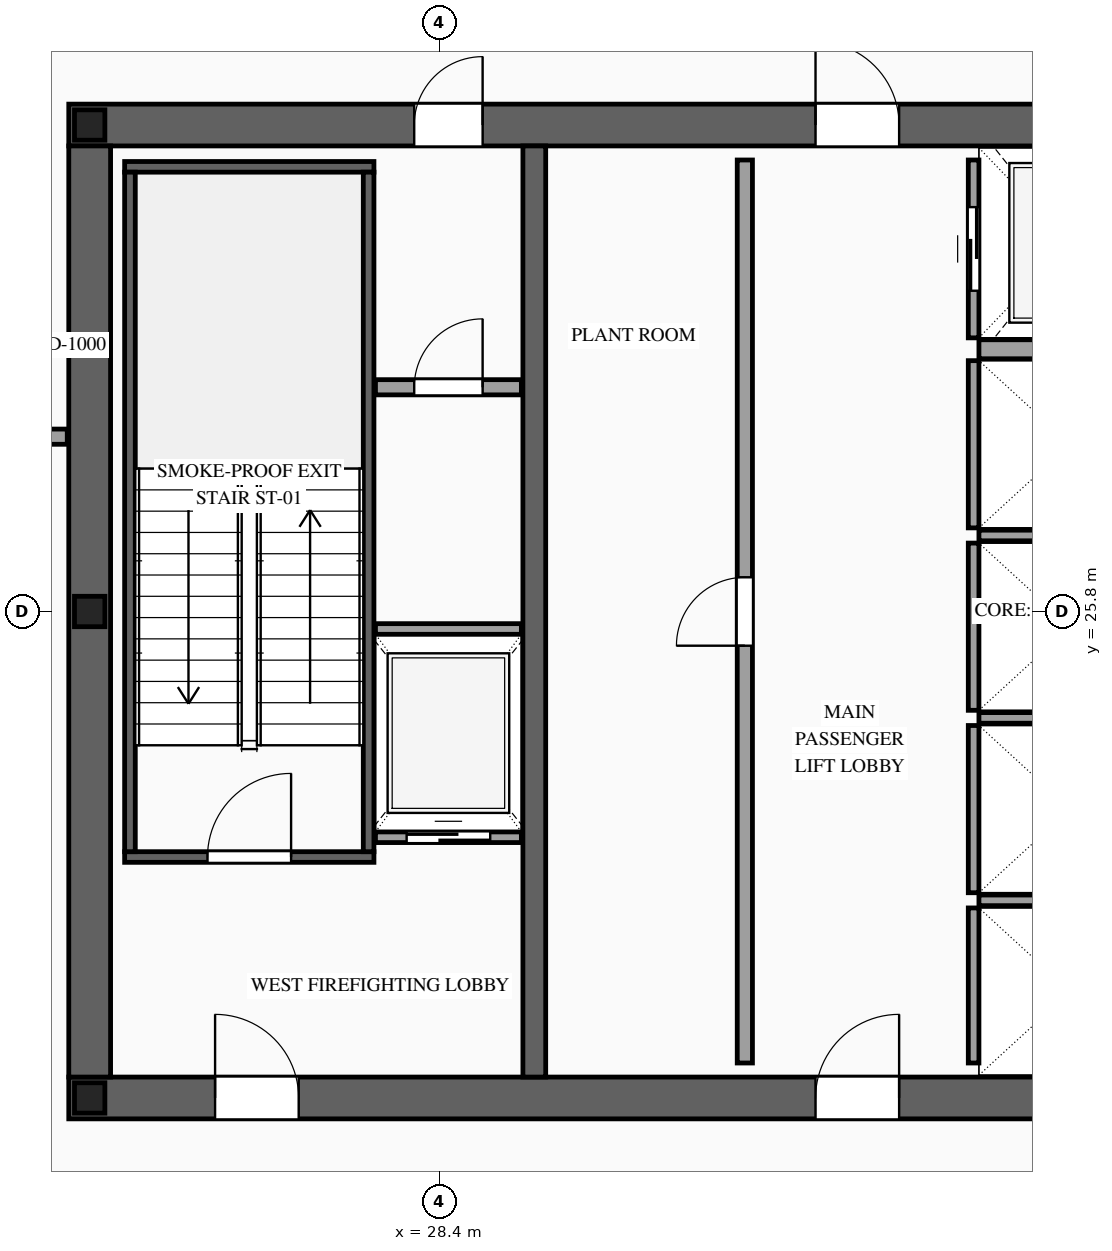
"""IFC4 building model, lengths in metres.
Left out: names, types, materials, properties, quantities, classifications, styles, units other than length and angle.
Written with IfcOpenShell. Run it as: python <this file> out.ifc"""

import sys

from ifc_helpers import new_model, si_unit, direction, frame, frame_2d, origin, origin_2d, place, context, subcontext, project, spatial, rectangle, i_section, extrude, source, transform, mapped, element, fill, save


model = new_model("IFC4")
c1 = context("Model", 3, precision=1e-05, world=origin(), true_north=direction((0.0, 1.0)))
c2 = subcontext(c1, "Body", "Model", "MODEL_VIEW")
j1 = project(units=[si_unit("LENGTHUNIT", "METRE"), si_unit("PLANEANGLEUNIT", "RADIAN")], contexts=[c1])
p1 = place(None, origin())
s1 = spatial("IfcSite", under=j1, at=p1, CompositionType="ELEMENT")
p2 = place(p1, origin())
s2 = spatial("IfcBuilding", under=s1, at=p2, CompositionType="ELEMENT")
p3 = place(p2, frame((0.0, 0.0, 263.5)))
s3 = spatial("IfcBuildingStorey", under=s2, at=p3, CompositionType="ELEMENT", Elevation=263.5)
p4 = place(p3, frame((23.525, 19.4, 0.0), z_axis=(0.0, 0.0, 1.0), x_axis=(1.0, 0.0, 0.0)))
e1 = element("IfcWall", 1, at=p4, inside=s3, PredefinedType="SHEAR", context=c2, shape_type="SweptSolid", body=[
    extrude(rectangle(XDim=26.95, YDim=0.55, at=frame_2d((13.475, 0.0))), origin(), (0.0, 0.0, 1.0), 4.6),
])
p5 = place(p4, frame((1.925, 0.0, 0.0)))
e2 = element("IfcOpeningElement", 2, at=p5, cuts=e1, PredefinedType="OPENING", context=c2, shape_type="SweptSolid", body=[
    extrude(rectangle(XDim=1.1, YDim=2.2, at=frame_2d((0.55, 1.1))), frame((0.0, 0.29, 0.0), z_axis=(0.0, -1.0, 0.0), x_axis=(1.0, 0.0, 0.0)), (0.0, 0.0, 1.0), 0.58),
])
p6 = place(p4, frame((9.825, 0.0, 0.0)))
e3 = element("IfcOpeningElement", 3, at=p6, cuts=e1, PredefinedType="OPENING", context=c2, shape_type="SweptSolid", body=[
    extrude(rectangle(XDim=1.1, YDim=2.2, at=frame_2d((0.55, 1.1))), frame((0.0, 0.29, 0.0), z_axis=(0.0, -1.0, 0.0), x_axis=(1.0, 0.0, 0.0)), (0.0, 0.0, 1.0), 0.58),
])
p7 = place(p4, frame((23.025, 0.0, 0.0)))
e4 = element("IfcOpeningElement", 4, at=p7, cuts=e1, PredefinedType="OPENING", context=c2, shape_type="SweptSolid", body=[
    extrude(rectangle(XDim=1.1, YDim=2.2, at=frame_2d((0.55, 1.1))), frame((0.0, 0.29, 0.0), z_axis=(0.0, -1.0, 0.0), x_axis=(1.0, 0.0, 0.0)), (0.0, 0.0, 1.0), 0.58),
])
p8 = place(p4, frame((19.645, 0.0, 0.0)))
e5 = element("IfcOpeningElement", 5, at=p8, cuts=e1, PredefinedType="OPENING", context=c2, shape_type="SweptSolid", body=[
    extrude(rectangle(XDim=0.9, YDim=2.15, at=frame_2d((0.45, 1.075))), frame((0.0, 0.29, 0.0), z_axis=(0.0, -1.0, 0.0), x_axis=(1.0, 0.0, 0.0)), (0.0, 0.0, 1.0), 0.58),
])
p9 = place(p3, frame((23.525, 32.2, 0.0), z_axis=(0.0, 0.0, 1.0), x_axis=(1.0, 0.0, 0.0)))
e6 = element("IfcWall", 6, at=p9, inside=s3, PredefinedType="SHEAR", context=c2, shape_type="SweptSolid", body=[
    extrude(rectangle(XDim=26.95, YDim=0.55, at=frame_2d((13.475, 0.0))), origin(), (0.0, 0.0, 1.0), 4.6),
])
p10 = place(p9, frame((4.545, 0.0, 0.0)))
e7 = element("IfcOpeningElement", 7, at=p10, cuts=e6, PredefinedType="OPENING", context=c2, shape_type="SweptSolid", body=[
    extrude(rectangle(XDim=0.9, YDim=2.15, at=frame_2d((0.45, 1.075))), frame((0.0, 0.29, 0.0), z_axis=(0.0, -1.0, 0.0), x_axis=(1.0, 0.0, 0.0)), (0.0, 0.0, 1.0), 0.58),
])
p11 = place(p9, frame((9.825, 0.0, 0.0)))
e8 = element("IfcOpeningElement", 8, at=p11, cuts=e6, PredefinedType="OPENING", context=c2, shape_type="SweptSolid", body=[
    extrude(rectangle(XDim=1.1, YDim=2.2, at=frame_2d((0.55, 1.1))), frame((0.0, 0.29, 0.0), z_axis=(0.0, -1.0, 0.0), x_axis=(1.0, 0.0, 0.0)), (0.0, 0.0, 1.0), 0.58),
])
p12 = place(p9, frame((15.675, 0.0, 0.0)))
e9 = element("IfcOpeningElement", 9, at=p12, cuts=e6, PredefinedType="OPENING", context=c2, shape_type="SweptSolid", body=[
    extrude(rectangle(XDim=1.1, YDim=2.2, at=frame_2d((0.55, 1.1))), frame((0.0, 0.29, 0.0), z_axis=(0.0, -1.0, 0.0), x_axis=(1.0, 0.0, 0.0)), (0.0, 0.0, 1.0), 0.58),
])
p13 = place(p9, frame((18.775, 0.0, 0.0)))
e10 = element("IfcOpeningElement", 10, at=p13, cuts=e6, PredefinedType="OPENING", context=c2, shape_type="SweptSolid", body=[
    extrude(rectangle(XDim=1.1, YDim=2.2, at=frame_2d((0.55, 1.1))), frame((0.0, 0.29, 0.0), z_axis=(0.0, -1.0, 0.0), x_axis=(1.0, 0.0, 0.0)), (0.0, 0.0, 1.0), 0.58),
])
m1 = source(origin(), c2, "Body", "SweptSolid", [
    extrude(rectangle(XDim=12.25, YDim=0.55, at=frame_2d((6.125, 0.0))), origin(), (0.0, 0.0, 1.0), 4.6),
])
p14 = place(p3, frame((23.8, 19.675, 0.0), z_axis=(0.0, 0.0, 1.0), x_axis=(0.0, 1.0, 0.0)))
e11 = element("IfcWall", 11, at=p14, inside=s3, PredefinedType="SHEAR", context=c2, shape_type="MappedRepresentation", body=[
    mapped(m1, transform((0.0, 0.0, 0.0), scale=1.0)),
])
m2 = source(origin(), c2, "Body", "SweptSolid", [
    extrude(rectangle(XDim=12.25, YDim=0.3, at=frame_2d((6.125, 0.0))), origin(), (0.0, 0.0, 1.0), 4.6),
])
p15 = place(p3, frame((29.65, 19.675, 0.0), z_axis=(0.0, 0.0, 1.0), x_axis=(0.0, 1.0, 0.0)))
e12 = element("IfcWall", 12, at=p15, inside=s3, PredefinedType="SOLIDWALL", context=c2, shape_type="MappedRepresentation", body=[
    mapped(m2, transform((0.0, 0.0, 0.0), scale=1.0)),
])
m3 = source(origin(), c2, "Body", "SweptSolid", [
    extrude(i_section(OverallWidth=0.4, OverallDepth=0.4, WebThickness=0.013, FlangeThickness=0.021, at=origin_2d()), origin(), (0.0, 0.0, 1.0), 4.6),
])
for number, where, z_axis, x_axis in (
    (13, (23.8, 19.4, 0.0), (0.0, 0.0, 1.0), (1.0, 0.0, 0.0)),
    (14, (23.8, 25.8, 0.0), (0.0, 0.0, 1.0), (1.0, 0.0, 0.0)),
    (15, (23.8, 32.2, 0.0), (0.0, 0.0, 1.0), (1.0, 0.0, 0.0)),
):
    element("IfcColumn", number, at=place(p3, frame(where, z_axis=z_axis, x_axis=x_axis)), inside=s3, PredefinedType="COLUMN", context=c2, shape_type="MappedRepresentation", body=[
        mapped(m3, transform((0.0, 0.0, 0.0), scale=1.0)),
    ])
p16 = place(p3, frame((27.56, 22.83, 0.0), z_axis=(0.0, 0.0, 1.0), x_axis=(1.0, 0.0, 0.0)))
e16 = element("IfcWall", 16, at=p16, inside=s3, PredefinedType="SOLIDWALL", context=c2, shape_type="SweptSolid", body=[
    extrude(rectangle(XDim=1.92, YDim=0.14, at=frame_2d((0.96, 0.0))), origin(), (0.0, 0.0, 1.0), 4.38),
])
p17 = place(p16, frame((0.41, 0.0, 0.0)))
e17 = element("IfcOpeningElement", 17, at=p17, cuts=e16, PredefinedType="OPENING", context=c2, shape_type="SweptSolid", body=[
    extrude(rectangle(XDim=1.1, YDim=2.2, at=frame_2d((0.55, 1.1))), frame((0.0, 0.085, 0.0), z_axis=(0.0, -1.0, 0.0), x_axis=(1.0, 0.0, 0.0)), (0.0, 0.0, 1.0), 0.17),
])
m4 = source(origin(), c2, "Body", "SweptSolid", [
    extrude(rectangle(XDim=1.92, YDim=0.14, at=frame_2d((0.96, 0.0))), origin(), (0.0, 0.0, 1.0), 4.38),
])
p18 = place(p3, frame((27.56, 25.57, 0.0), z_axis=(0.0, 0.0, 1.0), x_axis=(1.0, 0.0, 0.0)))
e18 = element("IfcWall", 18, at=p18, inside=s3, PredefinedType="SOLIDWALL", context=c2, shape_type="MappedRepresentation", body=[
    mapped(m4, transform((0.0, 0.0, 0.0), scale=1.0)),
])
m5 = source(origin(), c2, "Body", "SweptSolid", [
    extrude(rectangle(XDim=2.04, YDim=0.14, at=frame_2d((1.02, 0.0))), origin(), (0.0, 0.0, 1.0), 4.38),
])
p19 = place(p3, frame((35.43, 19.86, 0.0), z_axis=(0.0, 0.0, 1.0), x_axis=(0.0, 1.0, 0.0)))
e19 = element("IfcWall", 19, at=p19, inside=s3, PredefinedType="SOLIDWALL", context=c2, shape_type="MappedRepresentation", body=[
    mapped(m5, transform((0.0, 0.0, 0.0), scale=1.0)),
])
m6 = source(origin(), c2, "Body", "SweptSolid", [
    extrude(rectangle(XDim=2.4, YDim=0.14, at=frame_2d((1.2, 0.0))), origin(), (0.0, 0.0, 1.0), 4.38),
])
p20 = place(p3, frame((35.5, 22.0, 0.0), z_axis=(0.0, 0.0, 1.0), x_axis=(1.0, 0.0, 0.0)))
e20 = element("IfcWall", 20, at=p20, inside=s3, PredefinedType="SOLIDWALL", context=c2, shape_type="MappedRepresentation", body=[
    mapped(m6, transform((0.0, 0.0, 0.0), scale=1.0)),
])
m7 = source(origin(), c2, "Body", "SweptSolid", [
    extrude(rectangle(XDim=2.2, YDim=0.14, at=frame_2d((1.1, 0.0))), origin(), (0.0, 0.0, 1.0), 4.38),
])
p21 = place(p3, frame((35.43, 22.1, 0.0), z_axis=(0.0, 0.0, 1.0), x_axis=(0.0, 1.0, 0.0)))
e21 = element("IfcWall", 21, at=p21, inside=s3, PredefinedType="SOLIDWALL", context=c2, shape_type="MappedRepresentation", body=[
    mapped(m7, transform((0.0, 0.0, 0.0), scale=1.0)),
])
p22 = place(p3, frame((35.5, 24.4, 0.0), z_axis=(0.0, 0.0, 1.0), x_axis=(1.0, 0.0, 0.0)))
e22 = element("IfcWall", 22, at=p22, inside=s3, PredefinedType="SOLIDWALL", context=c2, shape_type="MappedRepresentation", body=[
    mapped(m6, transform((0.0, 0.0, 0.0), scale=1.0)),
])
p23 = place(p3, frame((35.43, 24.5, 0.0), z_axis=(0.0, 0.0, 1.0), x_axis=(0.0, 1.0, 0.0)))
e23 = element("IfcWall", 23, at=p23, inside=s3, PredefinedType="SOLIDWALL", context=c2, shape_type="MappedRepresentation", body=[
    mapped(m7, transform((0.0, 0.0, 0.0), scale=1.0)),
])
p24 = place(p3, frame((35.5, 26.8, 0.0), z_axis=(0.0, 0.0, 1.0), x_axis=(1.0, 0.0, 0.0)))
e24 = element("IfcWall", 24, at=p24, inside=s3, PredefinedType="SOLIDWALL", context=c2, shape_type="MappedRepresentation", body=[
    mapped(m6, transform((0.0, 0.0, 0.0), scale=1.0)),
])
m8 = source(origin(), c2, "Body", "SweptSolid", [
    extrude(rectangle(XDim=2.2, YDim=0.14, at=frame_2d((1.1, 0.0))), origin(), (0.0, 0.0, 1.0), 4.38),
])
p25 = place(p3, frame((35.43, 26.9, 0.0), z_axis=(0.0, 0.0, 1.0), x_axis=(0.0, 1.0, 0.0)))
e25 = element("IfcWall", 25, at=p25, inside=s3, PredefinedType="SOLIDWALL", context=c2, shape_type="MappedRepresentation", body=[
    mapped(m8, transform((0.0, 0.0, 0.0), scale=1.0)),
])
p26 = place(p3, frame((35.43, 29.4, 0.0), z_axis=(0.0, 0.0, 1.0), x_axis=(0.0, 1.0, 0.0)))
e26 = element("IfcWall", 26, at=p26, inside=s3, PredefinedType="SOLIDWALL", context=c2, shape_type="SweptSolid", body=[
    extrude(rectangle(XDim=2.34, YDim=0.14, at=frame_2d((1.17, 0.0))), origin(), (0.0, 0.0, 1.0), 4.38),
])
p27 = place(p26, frame((0.62, 0.0, 0.0)))
e27 = element("IfcOpeningElement", 27, at=p27, cuts=e26, PredefinedType="OPENING", context=c2, shape_type="SweptSolid", body=[
    extrude(rectangle(XDim=1.1, YDim=2.2, at=frame_2d((0.55, 1.1))), frame((0.0, 0.085, 0.0), z_axis=(0.0, -1.0, 0.0), x_axis=(1.0, 0.0, 0.0)), (0.0, 0.0, 1.0), 0.17),
])
m9 = source(origin(), c2, "Body", "SweptSolid", [
    extrude(rectangle(XDim=2.4, YDim=0.25, at=frame_2d((1.2, 0.0))), origin(), (0.0, 0.0, 1.0), 4.38),
])
p28 = place(p3, frame((35.5, 29.25, 0.0), z_axis=(0.0, 0.0, 1.0), x_axis=(1.0, 0.0, 0.0)))
e28 = element("IfcWall", 28, at=p28, inside=s3, PredefinedType="SOLIDWALL", context=c2, shape_type="MappedRepresentation", body=[
    mapped(m9, transform((0.0, 0.0, 0.0), scale=1.0)),
])
p29 = place(p3, frame((24.26, 22.57, 0.0), z_axis=(0.0, 0.0, 1.0), x_axis=(1.0, 0.0, 0.0)))
e29 = element("IfcWall", 29, at=p29, inside=s3, PredefinedType="SOLIDWALL", context=c2, shape_type="SweptSolid", body=[
    extrude(rectangle(XDim=3.28, YDim=0.14, at=frame_2d((1.64, 0.0))), origin(), (0.0, 0.0, 1.0), 4.38),
])
p30 = place(p29, frame((1.09, 0.0, 0.0)))
e30 = element("IfcOpeningElement", 30, at=p30, cuts=e29, PredefinedType="OPENING", context=c2, shape_type="SweptSolid", body=[
    extrude(rectangle(XDim=1.1, YDim=2.2, at=frame_2d((0.55, 1.1))), frame((0.0, 0.085, 0.0), z_axis=(0.0, -1.0, 0.0), x_axis=(1.0, 0.0, 0.0)), (0.0, 0.0, 1.0), 0.17),
])
m10 = source(origin(), c2, "Body", "SweptSolid", [
    extrude(rectangle(XDim=3.28, YDim=0.14, at=frame_2d((1.64, 0.0))), origin(), (0.0, 0.0, 1.0), 4.38),
])
p31 = place(p3, frame((24.26, 31.65, 0.0), z_axis=(0.0, 0.0, 1.0), x_axis=(1.0, 0.0, 0.0)))
e31 = element("IfcWall", 31, at=p31, inside=s3, PredefinedType="SOLIDWALL", context=c2, shape_type="MappedRepresentation", body=[
    mapped(m10, transform((0.0, 0.0, 0.0), scale=1.0)),
])
m11 = source(origin(), c2, "Body", "SweptSolid", [
    extrude(rectangle(XDim=8.94, YDim=0.14, at=frame_2d((4.47, 0.0))), origin(), (0.0, 0.0, 1.0), 4.38),
])
for number, where, z_axis, x_axis in (
    (32, (24.33, 22.64, 0.0), (0.0, 0.0, 1.0), (0.0, 1.0, 0.0)),
    (33, (27.47, 22.64, 0.0), (0.0, 0.0, 1.0), (0.0, 1.0, 0.0)),
):
    element("IfcWall", number, at=place(p3, frame(where, z_axis=z_axis, x_axis=x_axis)), inside=s3, PredefinedType="SOLIDWALL", context=c2, shape_type="MappedRepresentation", body=[
        mapped(m11, transform((0.0, 0.0, 0.0), scale=1.0)),
    ])
p32 = place(p3, frame((27.56, 28.75, 0.0), z_axis=(0.0, 0.0, 1.0), x_axis=(1.0, 0.0, 0.0)))
e34 = element("IfcWall", 34, at=p32, inside=s3, PredefinedType="PARTITIONING", context=c2, shape_type="SweptSolid", body=[
    extrude(rectangle(XDim=1.92, YDim=0.2, at=frame_2d((0.96, 0.0))), origin(), (0.0, 0.0, 1.0), 4.38),
])
p33 = place(p32, frame((0.51, 0.0, 0.0)))
e35 = element("IfcOpeningElement", 35, at=p33, cuts=e34, PredefinedType="OPENING", context=c2, shape_type="SweptSolid", body=[
    extrude(rectangle(XDim=0.9, YDim=2.15, at=frame_2d((0.45, 1.075))), frame((0.0, 0.115, 0.0), z_axis=(0.0, -1.0, 0.0), x_axis=(1.0, 0.0, 0.0)), (0.0, 0.0, 1.0), 0.23),
])
p34 = place(p3, frame((32.42, 19.86, 0.0), z_axis=(0.0, 0.0, 1.0), x_axis=(0.0, 1.0, 0.0)))
e36 = element("IfcWall", 36, at=p34, inside=s3, PredefinedType="PARTITIONING", context=c2, shape_type="SweptSolid", body=[
    extrude(rectangle(XDim=11.88, YDim=0.2, at=frame_2d((5.94, 0.0))), origin(), (0.0, 0.0, 1.0), 4.38),
])
p35 = place(p34, frame((5.49, 0.0, 0.0)))
e37 = element("IfcOpeningElement", 37, at=p35, cuts=e36, PredefinedType="OPENING", context=c2, shape_type="SweptSolid", body=[
    extrude(rectangle(XDim=0.9, YDim=2.15, at=frame_2d((0.45, 1.075))), frame((0.0, 0.115, 0.0), z_axis=(0.0, -1.0, 0.0), x_axis=(1.0, 0.0, 0.0)), (0.0, 0.0, 1.0), 0.23),
])
m12 = source(origin(), c2, "Body", "SweptSolid", [
    extrude(rectangle(XDim=1.555, YDim=0.2, at=frame_2d((0.777, 0.0))), origin(), (0.0, 0.0, 1.0), 4.38),
])
p36 = place(p3, frame((21.95, 28.1, 0.0), z_axis=(0.0, 0.0, 1.0), x_axis=(1.0, 0.0, 0.0)))
e38 = element("IfcWall", 38, at=p36, inside=s3, PredefinedType="PARTITIONING", context=c2, shape_type="MappedRepresentation", body=[
    mapped(m12, transform((0.0, 0.0, 0.0), scale=1.0)),
])
m13 = source(origin(), c2, "Body", "SweptSolid", [
    extrude(rectangle(XDim=1.1, YDim=2.2, at=frame_2d((0.55, 1.1))), frame((0.0, 0.025, 0.0), z_axis=(0.0, -1.0, 0.0), x_axis=(1.0, 0.0, 0.0)), (0.0, 0.0, 1.0), 0.05),
])
p37 = place(p17, origin())
e39 = element("IfcDoor", 39, at=p37, inside=s3, OperationType="SLIDING_TO_LEFT", PredefinedType="DOOR", context=c2, shape_type="MappedRepresentation", body=[
    mapped(m13, transform((0.0, 0.0, 0.0), scale=1.0)),
])
fill(e17, e39)
p38 = place(p27, origin())
e40 = element("IfcDoor", 40, at=p38, inside=s3, OperationType="SLIDING_TO_RIGHT", PredefinedType="DOOR", context=c2, shape_type="MappedRepresentation", body=[
    mapped(m13, transform((0.0, 0.0, 0.0), scale=1.0)),
])
fill(e27, e40)
m14 = source(origin(), c2, "Body", "SweptSolid", [
    extrude(rectangle(XDim=1.1, YDim=2.2, at=frame_2d((0.55, 1.1))), frame((0.0, 0.025, 0.0), z_axis=(0.0, -1.0, 0.0), x_axis=(1.0, 0.0, 0.0)), (0.0, 0.0, 1.0), 0.05),
])
p39 = place(p30, origin())
e41 = element("IfcDoor", 41, at=p39, inside=s3, OperationType="SINGLE_SWING_RIGHT", PredefinedType="DOOR", context=c2, shape_type="MappedRepresentation", body=[
    mapped(m14, transform((0.0, 0.0, 0.0), scale=1.0)),
])
fill(e30, e41)
p40 = place(p5, origin())
e42 = element("IfcDoor", 42, at=p40, inside=s3, OperationType="SINGLE_SWING_LEFT", PredefinedType="DOOR", context=c2, shape_type="MappedRepresentation", body=[
    mapped(m14, transform((0.0, 0.0, 0.0), scale=1.0)),
])
fill(e2, e42)
p41 = place(p6, origin())
e43 = element("IfcDoor", 43, at=p41, inside=s3, OperationType="SINGLE_SWING_RIGHT", PredefinedType="DOOR", context=c2, shape_type="MappedRepresentation", body=[
    mapped(m14, transform((0.0, 0.0, 0.0), scale=1.0)),
])
fill(e3, e43)
m15 = source(origin(), c2, "Body", "SweptSolid", [
    extrude(rectangle(XDim=0.9, YDim=2.15, at=frame_2d((0.45, 1.075))), frame((0.0, 0.025, 0.0), z_axis=(0.0, -1.0, 0.0), x_axis=(1.0, 0.0, 0.0)), (0.0, 0.0, 1.0), 0.05),
])
p42 = place(p10, origin())
e44 = element("IfcDoor", 44, at=p42, inside=s3, OperationType="SINGLE_SWING_RIGHT", PredefinedType="DOOR", context=c2, shape_type="MappedRepresentation", body=[
    mapped(m15, transform((0.0, 0.0, 0.0), scale=1.0)),
])
fill(e7, e44)
p43 = place(p11, origin())
e45 = element("IfcDoor", 45, at=p43, inside=s3, OperationType="SINGLE_SWING_LEFT", PredefinedType="DOOR", context=c2, shape_type="MappedRepresentation", body=[
    mapped(m14, transform((0.0, 0.0, 0.0), scale=1.0)),
])
fill(e8, e45)
p44 = place(p33, origin())
e46 = element("IfcDoor", 46, at=p44, inside=s3, OperationType="SINGLE_SWING_RIGHT", PredefinedType="DOOR", context=c2, shape_type="MappedRepresentation", body=[
    mapped(m15, transform((0.0, 0.0, 0.0), scale=1.0)),
])
fill(e35, e46)
p45 = place(p35, origin())
e47 = element("IfcDoor", 47, at=p45, inside=s3, OperationType="SINGLE_SWING_LEFT", PredefinedType="DOOR", context=c2, shape_type="MappedRepresentation", body=[
    mapped(m15, transform((0.0, 0.0, 0.0), scale=1.0)),
])
fill(e37, e47)
save(model, sys.argv[1])
